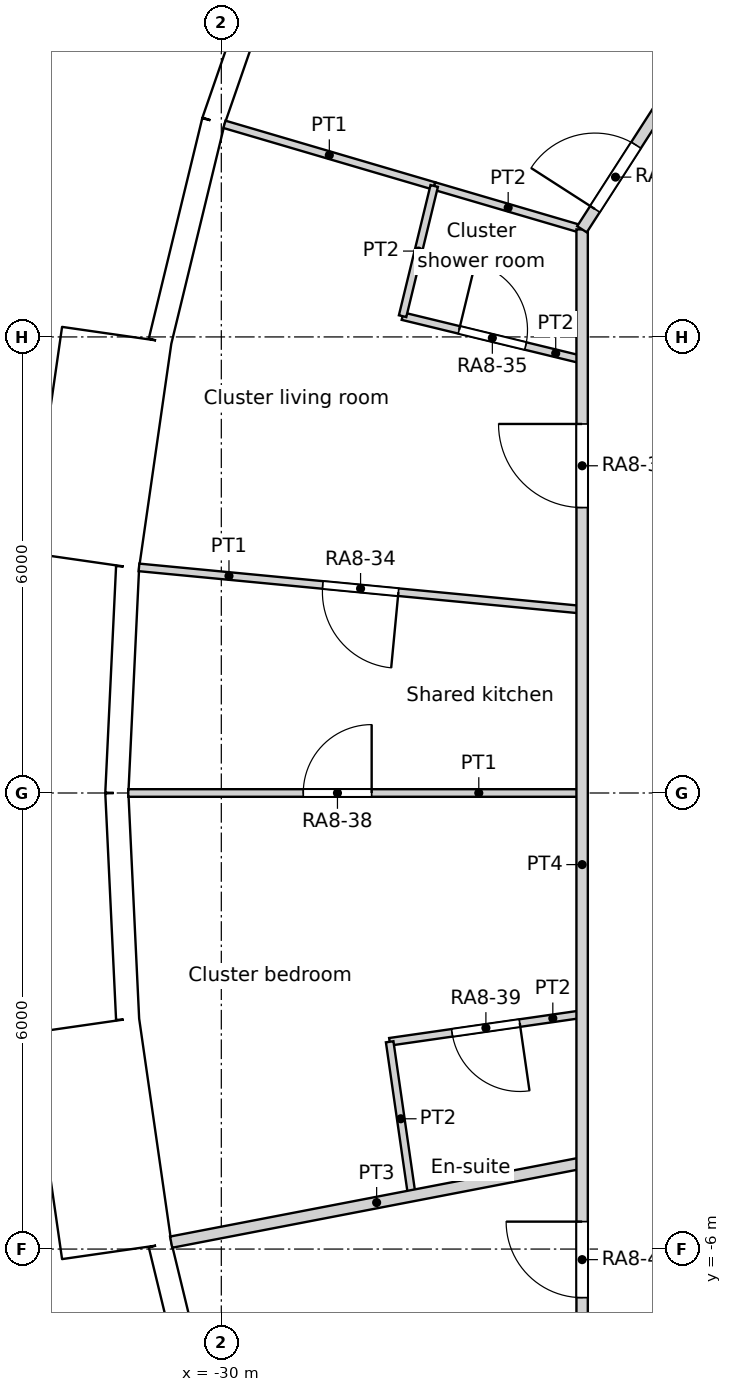
"""IFC4 building model, lengths in metres.
Left out: names, types, materials, properties, quantities, classifications, styles, units other than length and angle.
Written with IfcOpenShell. Run it as: python <this file> out.ifc"""

import sys

from ifc_helpers import new_model, si_unit, direction, frame, frame_2d, origin, origin_2d, place, context, subcontext, project, spatial, rectangle, circle, extrude, element, fill, save


model = new_model("IFC4")
c1 = context("Model", 3, precision=1e-05, world=origin(), true_north=direction((0.0, 1.0)))
c2 = subcontext(c1, "Body", "Model", "MODEL_VIEW")
j1 = project(units=[si_unit("LENGTHUNIT", "METRE"), si_unit("PLANEANGLEUNIT", "RADIAN")], contexts=[c1])
p1 = place(None, origin())
s1 = spatial("IfcSite", under=j1, at=p1, CompositionType="ELEMENT")
p2 = place(p1, origin())
s2 = spatial("IfcBuilding", under=s1, at=p2, CompositionType="ELEMENT")
p3 = place(p2, frame((0.0, 0.0, 103.8)))
s3 = spatial("IfcBuildingStorey", under=s2, at=p3, CompositionType="ELEMENT", Elevation=103.8)
for number, where, z_axis, x_axis in (
    (1, (-29.048, 8.529, 0.0), (0.0, 0.0, 1.0), (1.0, 0.0, 0.0)),
    (2, (-30.137, 2.878, 0.0), (0.0, 0.0, 1.0), (1.0, 0.0, 0.0)),
    (3, (-30.137, -2.878, 0.0), (0.0, 0.0, 1.0), (1.0, 0.0, 0.0)),
):
    element("IfcColumn", number, at=place(p3, frame(where, z_axis=z_axis, x_axis=x_axis)), inside=s3, PredefinedType="COLUMN", context=c2, shape_type="SweptSolid", body=[
        extrude(circle(Radius=0.6, at=origin_2d()), origin(), (0.0, 0.0, 1.0), 3.6),
    ])
for number, where, z_axis, x_axis in (
    (4, (-24.382, 2.85, 0.0), (0.0, 0.0, 1.0), (1.0, 0.0, 0.0)),
    (5, (-24.382, -2.85, 0.0), (0.0, 0.0, 1.0), (1.0, 0.0, 0.0)),
):
    element("IfcColumn", number, at=place(p3, frame(where, z_axis=z_axis, x_axis=x_axis)), inside=s3, PredefinedType="COLUMN", context=c2, shape_type="SweptSolid", body=[
        extrude(circle(Radius=0.65, at=origin_2d()), origin(), (0.0, 0.0, 1.0), 3.6),
    ])
p4 = place(p3, frame((-29.129, 11.655, 0.0), z_axis=(0.0, 0.0, 1.0), x_axis=(-0.327071167136, -0.944999709856, 0.0)))
e6 = element("IfcWall", 6, at=p4, inside=s3, PredefinedType="SOLIDWALL", context=c2, shape_type="SweptSolid", body=[
    extrude(rectangle(XDim=2.98, YDim=0.3, at=frame_2d((1.49, 0.0))), origin(), (0.0, 0.0, 1.0), 3.15),
])
p5 = place(p4, frame((1.49, 0.0, 1.55)))
e7 = element("IfcOpeningElement", 7, at=p5, cuts=e6, PredefinedType="OPENING", context=c2, shape_type="SweptSolid", body=[
    extrude(circle(Radius=0.9, at=origin_2d()), frame((0.0, 0.16, 0.0), z_axis=(0.0, -1.0, 0.0), x_axis=(1.0, 0.0, 0.0)), (0.0, 0.0, 1.0), 0.32),
])
p6 = place(p3, frame((-30.104, 8.839, 0.0), z_axis=(0.0, 0.0, 1.0), x_axis=(-0.235743081534, -0.971815414319, 0.0)))
e8 = element("IfcWall", 8, at=p6, inside=s3, PredefinedType="SOLIDWALL", context=c2, shape_type="SweptSolid", body=[
    extrude(rectangle(XDim=2.979, YDim=0.3, at=frame_2d((1.49, 0.0))), origin(), (0.0, 0.0, 1.0), 3.15),
])
p7 = place(p6, frame((1.49, 0.0, 1.55)))
e9 = element("IfcOpeningElement", 9, at=p7, cuts=e8, PredefinedType="OPENING", context=c2, shape_type="SweptSolid", body=[
    extrude(circle(Radius=0.9, at=origin_2d()), frame((0.0, 0.16, 0.0), z_axis=(0.0, -1.0, 0.0), x_axis=(1.0, 0.0, 0.0)), (0.0, 0.0, 1.0), 0.32),
])
p8 = place(p3, frame((-31.375, 6.027, -0.45), z_axis=(0.0, 0.0, 1.0), x_axis=(-0.142332746704, -0.989818866872, 0.0)))
e10 = element("IfcWall", 10, at=p8, inside=s3, PredefinedType="ELEMENTEDWALL", context=c2, shape_type="SweptSolid", body=[
    extrude(rectangle(XDim=3.0, YDim=1.45, at=frame_2d((1.5, 0.0))), origin(), (0.0, 0.0, 1.0), 3.6),
])
p9 = place(p8, frame((1.5, 0.0, 2.0)))
e11 = element("IfcOpeningElement", 11, at=p9, cuts=e10, PredefinedType="OPENING", context=c2, shape_type="SweptSolid", body=[
    extrude(circle(Radius=0.9, at=origin_2d()), frame((0.0, 0.735, 0.0), z_axis=(0.0, -1.0, 0.0), x_axis=(1.0, 0.0, 0.0)), (0.0, 0.0, 1.0), 1.47),
])
p10 = place(p3, frame((-31.233, 2.976, 0.0), z_axis=(0.0, 0.0, 1.0), x_axis=(-0.047604077644, -0.998866283239, 0.0)))
e12 = element("IfcWall", 12, at=p10, inside=s3, PredefinedType="SOLIDWALL", context=c2, shape_type="SweptSolid", body=[
    extrude(rectangle(XDim=2.98, YDim=0.3, at=frame_2d((1.49, 0.0))), origin(), (0.0, 0.0, 1.0), 3.15),
])
p11 = place(p10, frame((1.49, 0.0, 1.55)))
e13 = element("IfcOpeningElement", 13, at=p11, cuts=e12, PredefinedType="OPENING", context=c2, shape_type="SweptSolid", body=[
    extrude(circle(Radius=0.9, at=origin_2d()), frame((0.0, 0.16, 0.0), z_axis=(0.0, -1.0, 0.0), x_axis=(1.0, 0.0, 0.0)), (0.0, 0.0, 1.0), 0.32),
])
p12 = place(p3, frame((-31.375, 0.0, 0.0), z_axis=(0.0, 0.0, 1.0), x_axis=(0.047604077644, -0.998866283239, 0.0)))
e14 = element("IfcWall", 14, at=p12, inside=s3, PredefinedType="SOLIDWALL", context=c2, shape_type="SweptSolid", body=[
    extrude(rectangle(XDim=2.98, YDim=0.3, at=frame_2d((1.49, 0.0))), origin(), (0.0, 0.0, 1.0), 3.15),
])
p13 = place(p12, frame((1.49, 0.0, 1.55)))
e15 = element("IfcOpeningElement", 15, at=p13, cuts=e14, PredefinedType="OPENING", context=c2, shape_type="SweptSolid", body=[
    extrude(circle(Radius=0.9, at=origin_2d()), frame((0.0, 0.16, 0.0), z_axis=(0.0, -1.0, 0.0), x_axis=(1.0, 0.0, 0.0)), (0.0, 0.0, 1.0), 0.32),
])
p14 = place(p3, frame((-31.802, -3.057, -0.45), z_axis=(0.0, 0.0, 1.0), x_axis=(0.142332746704, -0.989818866872, 0.0)))
e16 = element("IfcWall", 16, at=p14, inside=s3, PredefinedType="ELEMENTEDWALL", context=c2, shape_type="SweptSolid", body=[
    extrude(rectangle(XDim=3.0, YDim=1.45, at=frame_2d((1.5, 0.0))), origin(), (0.0, 0.0, 1.0), 3.6),
])
p15 = place(p14, frame((1.5, 0.0, 2.0)))
e17 = element("IfcOpeningElement", 17, at=p15, cuts=e16, PredefinedType="OPENING", context=c2, shape_type="SweptSolid", body=[
    extrude(circle(Radius=0.9, at=origin_2d()), frame((0.0, 0.735, 0.0), z_axis=(0.0, -1.0, 0.0), x_axis=(1.0, 0.0, 0.0)), (0.0, 0.0, 1.0), 1.47),
])
p16 = place(p3, frame((-30.806, -5.944, 0.0), z_axis=(0.0, 0.0, 1.0), x_axis=(0.235743081534, -0.971815414319, 0.0)))
e18 = element("IfcWall", 18, at=p16, inside=s3, PredefinedType="SOLIDWALL", context=c2, shape_type="SweptSolid", body=[
    extrude(rectangle(XDim=2.979, YDim=0.3, at=frame_2d((1.49, 0.0))), origin(), (0.0, 0.0, 1.0), 3.15),
])
p17 = place(p16, frame((1.49, 0.0, 1.55)))
e19 = element("IfcOpeningElement", 19, at=p17, cuts=e18, PredefinedType="OPENING", context=c2, shape_type="SweptSolid", body=[
    extrude(circle(Radius=0.9, at=origin_2d()), frame((0.0, 0.16, 0.0), z_axis=(0.0, -1.0, 0.0), x_axis=(1.0, 0.0, 0.0)), (0.0, 0.0, 1.0), 0.32),
])
p18 = place(p3, frame((-25.255, 7.416, 0.0), z_axis=(0.0, 0.0, 1.0), x_axis=(0.540805851332, 0.841147449123, 0.0)))
e20 = element("IfcWall", 20, at=p18, inside=s3, PredefinedType="PARTITIONING", context=c2, shape_type="SweptSolid", body=[
    extrude(rectangle(XDim=14.829, YDim=0.15, at=frame_2d((7.415, 0.0))), origin(), (0.0, 0.0, 1.0), 3.15),
])
p19 = place(p18, frame((8.754, 0.0, 0.0)))
e21 = element("IfcOpeningElement", 21, at=p19, cuts=e20, PredefinedType="OPENING", context=c2, shape_type="SweptSolid", body=[
    extrude(rectangle(XDim=1.0, YDim=2.04, at=frame_2d((0.5, 1.02))), frame((0.0, 0.075, 0.0), z_axis=(0.0, -1.0, 0.0), x_axis=(1.0, 0.0, 0.0)), (0.0, 0.0, 1.0), 0.15),
])
p20 = place(p18, frame((0.316, 0.0, 0.0)))
e22 = element("IfcOpeningElement", 22, at=p20, cuts=e20, PredefinedType="OPENING", context=c2, shape_type="SweptSolid", body=[
    extrude(rectangle(XDim=1.0, YDim=2.1, at=frame_2d((0.5, 1.05))), frame((0.0, 0.075, 0.0), z_axis=(0.0, -1.0, 0.0), x_axis=(1.0, 0.0, 0.0)), (0.0, 0.0, 1.0), 0.15),
])
p21 = place(p3, frame((-25.253, -7.415, 0.0), z_axis=(0.0, 0.0, 1.0), x_axis=(0.0, 1.0, 0.0)))
e23 = element("IfcWall", 23, at=p21, inside=s3, PredefinedType="PARTITIONING", context=c2, shape_type="SweptSolid", body=[
    extrude(rectangle(XDim=14.83, YDim=0.15, at=frame_2d((7.415, 0.0))), origin(), (0.0, 0.0, 1.0), 3.15),
])
p22 = place(p21, frame((11.17, 0.0, 0.0)))
e24 = element("IfcOpeningElement", 24, at=p22, cuts=e23, PredefinedType="OPENING", context=c2, shape_type="SweptSolid", body=[
    extrude(rectangle(XDim=1.1, YDim=2.1, at=frame_2d((0.55, 1.05))), frame((0.0, 0.075, 0.0), z_axis=(0.0, -1.0, 0.0), x_axis=(1.0, 0.0, 0.0)), (0.0, 0.0, 1.0), 0.15),
])
p23 = place(p21, frame((0.776, 0.0, 0.0)))
e25 = element("IfcOpeningElement", 25, at=p23, cuts=e23, PredefinedType="OPENING", context=c2, shape_type="SweptSolid", body=[
    extrude(rectangle(XDim=1.0, YDim=2.1, at=frame_2d((0.5, 1.05))), frame((0.0, 0.075, 0.0), z_axis=(0.0, -1.0, 0.0), x_axis=(1.0, 0.0, 0.0)), (0.0, 0.0, 1.0), 0.15),
])
p24 = place(p3, frame((-31.083, 2.968, 0.0), z_axis=(0.0, 0.0, 1.0), x_axis=(0.995465070325, -0.095127775983, 0.0)))
e26 = element("IfcWall", 26, at=p24, inside=s3, PredefinedType="PARTITIONING", context=c2, shape_type="SweptSolid", body=[
    extrude(rectangle(XDim=5.857, YDim=0.1, at=frame_2d((2.928, 0.0))), origin(), (0.0, 0.0, 1.0), 3.15),
])
p25 = place(p24, frame((2.428, 0.0, 0.0)))
e27 = element("IfcOpeningElement", 27, at=p25, cuts=e26, PredefinedType="OPENING", context=c2, shape_type="SweptSolid", body=[
    extrude(rectangle(XDim=1.0, YDim=2.04, at=frame_2d((0.5, 1.02))), frame((0.0, 0.05, 0.0), z_axis=(0.0, -1.0, 0.0), x_axis=(1.0, 0.0, 0.0)), (0.0, 0.0, 1.0), 0.1),
])
p26 = place(p3, frame((-27.615, 6.273, 0.0), z_axis=(0.0, 0.0, 1.0), x_axis=(0.23598051436, 0.971757787127, 0.0)))
e28 = element("IfcWall", 28, at=p26, inside=s3, PredefinedType="PARTITIONING", context=c2, shape_type="SweptSolid", body=[
    extrude(rectangle(XDim=1.763, YDim=0.1, at=frame_2d((0.881, 0.0))), origin(), (0.0, 0.0, 1.0), 3.15),
])
p27 = place(p3, frame((-27.615, 6.273, 0.0), z_axis=(0.0, 0.0, 1.0), x_axis=(0.971814550876, -0.235746640921, 0.0)))
e29 = element("IfcWall", 29, at=p27, inside=s3, PredefinedType="PARTITIONING", context=c2, shape_type="SweptSolid", body=[
    extrude(rectangle(XDim=2.431, YDim=0.1, at=frame_2d((1.215, 0.0))), origin(), (0.0, 0.0, 1.0), 3.15),
])
p28 = place(p27, frame((0.765, 0.0, 0.0)))
e30 = element("IfcOpeningElement", 30, at=p28, cuts=e29, PredefinedType="OPENING", context=c2, shape_type="SweptSolid", body=[
    extrude(rectangle(XDim=0.9, YDim=2.0, at=frame_2d((0.45, 1.0))), frame((0.0, 0.05, 0.0), z_axis=(0.0, -1.0, 0.0), x_axis=(1.0, 0.0, 0.0)), (0.0, 0.0, 1.0), 0.1),
])
p29 = place(p3, frame((-29.959, 8.797, 0.0), z_axis=(0.0, 0.0, 1.0), x_axis=(0.959434394536, -0.281931982189, 0.0)))
e31 = element("IfcWall", 31, at=p29, inside=s3, PredefinedType="PARTITIONING", context=c2, shape_type="SweptSolid", body=[
    extrude(rectangle(XDim=2.877, YDim=0.1, at=frame_2d((1.438, 0.0))), origin(), (0.0, 0.0, 1.0), 3.15),
])
p30 = place(p3, frame((-31.224, 0.0, 0.0), z_axis=(0.0, 0.0, 1.0), x_axis=(1.0, 0.0, 0.0)))
e32 = element("IfcWall", 32, at=p30, inside=s3, PredefinedType="PARTITIONING", context=c2, shape_type="SweptSolid", body=[
    extrude(rectangle(XDim=5.971, YDim=0.1, at=frame_2d((2.986, 0.0))), origin(), (0.0, 0.0, 1.0), 3.15),
])
p31 = place(p30, frame((2.302, 0.0, 0.0)))
e33 = element("IfcOpeningElement", 33, at=p31, cuts=e32, PredefinedType="OPENING", context=c2, shape_type="SweptSolid", body=[
    extrude(rectangle(XDim=0.9, YDim=2.1, at=frame_2d((0.45, 1.05))), frame((0.0, 0.05, 0.0), z_axis=(0.0, -1.0, 0.0), x_axis=(1.0, 0.0, 0.0)), (0.0, 0.0, 1.0), 0.1),
])
p32 = place(p3, frame((-27.199, 7.986, 0.0), z_axis=(0.0, 0.0, 1.0), x_axis=(0.959541665722, -0.281566673708, 0.0)))
e34 = element("IfcWall", 34, at=p32, inside=s3, PredefinedType="PARTITIONING", context=c2, shape_type="SweptSolid", body=[
    extrude(rectangle(XDim=2.028, YDim=0.1, at=frame_2d((1.014, 0.0))), origin(), (0.0, 0.0, 1.0), 3.15),
])
p33 = place(p3, frame((-27.785, -3.273, 0.0), z_axis=(0.0, 0.0, 1.0), x_axis=(0.989823118164, 0.142303178978, 0.0)))
e35 = element("IfcWall", 35, at=p33, inside=s3, PredefinedType="PARTITIONING", context=c2, shape_type="SweptSolid", body=[
    extrude(rectangle(XDim=2.558, YDim=0.1, at=frame_2d((1.279, 0.0))), origin(), (0.0, 0.0, 1.0), 3.15),
])
p34 = place(p33, frame((0.829, 0.0, 0.0)))
e36 = element("IfcOpeningElement", 36, at=p34, cuts=e35, PredefinedType="OPENING", context=c2, shape_type="SweptSolid", body=[
    extrude(rectangle(XDim=0.9, YDim=2.04, at=frame_2d((0.45, 1.02))), frame((0.0, 0.05, 0.0), z_axis=(0.0, -1.0, 0.0), x_axis=(1.0, 0.0, 0.0)), (0.0, 0.0, 1.0), 0.1),
])
p35 = place(p3, frame((-27.785, -3.273, 0.0), z_axis=(0.0, 0.0, 1.0), x_axis=(0.142640130423, -0.989774617372, 0.0)))
e37 = element("IfcWall", 37, at=p35, inside=s3, PredefinedType="PARTITIONING", context=c2, shape_type="SweptSolid", body=[
    extrude(rectangle(XDim=2.047, YDim=0.1, at=frame_2d((1.023, 0.0))), origin(), (0.0, 0.0, 1.0), 3.15),
])
p36 = place(p3, frame((-30.66, -5.909, 0.0), z_axis=(0.0, 0.0, 1.0), x_axis=(0.981949161207, 0.189145036425, 0.0)))
e38 = element("IfcWall", 38, at=p36, inside=s3, PredefinedType="PARTITIONING", context=c2, shape_type="SweptSolid", body=[
    extrude(rectangle(XDim=5.506, YDim=0.15, at=frame_2d((2.753, 0.0))), origin(), (0.0, 0.0, 1.0), 3.15),
])
p37 = place(p5, origin())
e39 = element("IfcWindow", 39, at=p37, inside=s3, PartitioningType="SINGLE_PANEL", PredefinedType="WINDOW", context=c2, shape_type="SweptSolid", body=[
    extrude(circle(Radius=0.9, at=origin_2d()), frame((0.0, 0.12, 0.0), z_axis=(0.0, -1.0, 0.0), x_axis=(1.0, 0.0, 0.0)), (0.0, 0.0, 1.0), 0.1),
])
fill(e7, e39)
p38 = place(p7, origin())
e40 = element("IfcWindow", 40, at=p38, inside=s3, PartitioningType="SINGLE_PANEL", PredefinedType="WINDOW", context=c2, shape_type="SweptSolid", body=[
    extrude(circle(Radius=0.9, at=origin_2d()), frame((0.0, 0.12, 0.0), z_axis=(0.0, -1.0, 0.0), x_axis=(1.0, 0.0, 0.0)), (0.0, 0.0, 1.0), 0.1),
])
fill(e9, e40)
p39 = place(p9, origin())
e41 = element("IfcWindow", 41, at=p39, inside=s3, PartitioningType="SINGLE_PANEL", PredefinedType="WINDOW", context=c2, shape_type="SweptSolid", body=[
    extrude(circle(Radius=0.9, at=origin_2d()), frame((0.0, 0.695, 0.0), z_axis=(0.0, -1.0, 0.0), x_axis=(1.0, 0.0, 0.0)), (0.0, 0.0, 1.0), 0.1),
])
fill(e11, e41)
p40 = place(p11, origin())
e42 = element("IfcWindow", 42, at=p40, inside=s3, PartitioningType="SINGLE_PANEL", PredefinedType="WINDOW", context=c2, shape_type="SweptSolid", body=[
    extrude(circle(Radius=0.9, at=origin_2d()), frame((0.0, 0.12, 0.0), z_axis=(0.0, -1.0, 0.0), x_axis=(1.0, 0.0, 0.0)), (0.0, 0.0, 1.0), 0.1),
])
fill(e13, e42)
p41 = place(p13, origin())
e43 = element("IfcWindow", 43, at=p41, inside=s3, PartitioningType="SINGLE_PANEL", PredefinedType="WINDOW", context=c2, shape_type="SweptSolid", body=[
    extrude(circle(Radius=0.9, at=origin_2d()), frame((0.0, 0.12, 0.0), z_axis=(0.0, -1.0, 0.0), x_axis=(1.0, 0.0, 0.0)), (0.0, 0.0, 1.0), 0.1),
])
fill(e15, e43)
p42 = place(p15, origin())
e44 = element("IfcWindow", 44, at=p42, inside=s3, PartitioningType="SINGLE_PANEL", PredefinedType="WINDOW", context=c2, shape_type="SweptSolid", body=[
    extrude(circle(Radius=0.9, at=origin_2d()), frame((0.0, 0.695, 0.0), z_axis=(0.0, -1.0, 0.0), x_axis=(1.0, 0.0, 0.0)), (0.0, 0.0, 1.0), 0.1),
])
fill(e17, e44)
p43 = place(p17, origin())
e45 = element("IfcWindow", 45, at=p43, inside=s3, PartitioningType="SINGLE_PANEL", PredefinedType="WINDOW", context=c2, shape_type="SweptSolid", body=[
    extrude(circle(Radius=0.9, at=origin_2d()), frame((0.0, 0.12, 0.0), z_axis=(0.0, -1.0, 0.0), x_axis=(1.0, 0.0, 0.0)), (0.0, 0.0, 1.0), 0.1),
])
fill(e19, e45)
p44 = place(p22, origin())
e46 = element("IfcDoor", 46, at=p44, inside=s3, OperationType="SINGLE_SWING_RIGHT", PredefinedType="DOOR", context=c2, shape_type="SweptSolid", body=[
    extrude(rectangle(XDim=1.1, YDim=2.1, at=frame_2d((0.55, 1.05))), frame((0.0, 0.025, 0.0), z_axis=(0.0, -1.0, 0.0), x_axis=(1.0, 0.0, 0.0)), (0.0, 0.0, 1.0), 0.05),
])
fill(e24, e46)
p45 = place(p25, origin())
e47 = element("IfcDoor", 47, at=p45, inside=s3, OperationType="SINGLE_SWING_LEFT", PredefinedType="DOOR", context=c2, shape_type="SweptSolid", body=[
    extrude(rectangle(XDim=1.0, YDim=2.04, at=frame_2d((0.5, 1.02))), frame((0.0, 0.025, 0.0), z_axis=(0.0, -1.0, 0.0), x_axis=(1.0, 0.0, 0.0)), (0.0, 0.0, 1.0), 0.05),
])
fill(e27, e47)
p46 = place(p28, origin())
e48 = element("IfcDoor", 48, at=p46, inside=s3, OperationType="SINGLE_SWING_LEFT", PredefinedType="DOOR", context=c2, shape_type="SweptSolid", body=[
    extrude(rectangle(XDim=0.9, YDim=2.0, at=frame_2d((0.45, 1.0))), frame((0.0, 0.025, 0.0), z_axis=(0.0, -1.0, 0.0), x_axis=(1.0, 0.0, 0.0)), (0.0, 0.0, 1.0), 0.05),
])
fill(e30, e48)
p47 = place(p20, origin())
e49 = element("IfcDoor", 49, at=p47, inside=s3, OperationType="SINGLE_SWING_LEFT", PredefinedType="DOOR", context=c2, shape_type="SweptSolid", body=[
    extrude(rectangle(XDim=1.0, YDim=2.1, at=frame_2d((0.5, 1.05))), frame((0.0, 0.025, 0.0), z_axis=(0.0, -1.0, 0.0), x_axis=(1.0, 0.0, 0.0)), (0.0, 0.0, 1.0), 0.05),
])
fill(e22, e49)
p48 = place(p31, origin())
e50 = element("IfcDoor", 50, at=p48, inside=s3, OperationType="SINGLE_SWING_RIGHT", PredefinedType="DOOR", context=c2, shape_type="SweptSolid", body=[
    extrude(rectangle(XDim=0.9, YDim=2.1, at=frame_2d((0.45, 1.05))), frame((0.0, 0.025, 0.0), z_axis=(0.0, -1.0, 0.0), x_axis=(1.0, 0.0, 0.0)), (0.0, 0.0, 1.0), 0.05),
])
fill(e33, e50)
p49 = place(p34, origin())
e51 = element("IfcDoor", 51, at=p49, inside=s3, OperationType="SINGLE_SWING_LEFT", PredefinedType="DOOR", context=c2, shape_type="SweptSolid", body=[
    extrude(rectangle(XDim=0.9, YDim=2.04, at=frame_2d((0.45, 1.02))), frame((0.0, 0.025, 0.0), z_axis=(0.0, -1.0, 0.0), x_axis=(1.0, 0.0, 0.0)), (0.0, 0.0, 1.0), 0.05),
])
fill(e36, e51)
p50 = place(p23, origin())
e52 = element("IfcDoor", 52, at=p50, inside=s3, OperationType="SINGLE_SWING_RIGHT", PredefinedType="DOOR", context=c2, shape_type="SweptSolid", body=[
    extrude(rectangle(XDim=1.0, YDim=2.1, at=frame_2d((0.5, 1.05))), frame((0.0, 0.025, 0.0), z_axis=(0.0, -1.0, 0.0), x_axis=(1.0, 0.0, 0.0)), (0.0, 0.0, 1.0), 0.05),
])
fill(e25, e52)
save(model, sys.argv[1])
